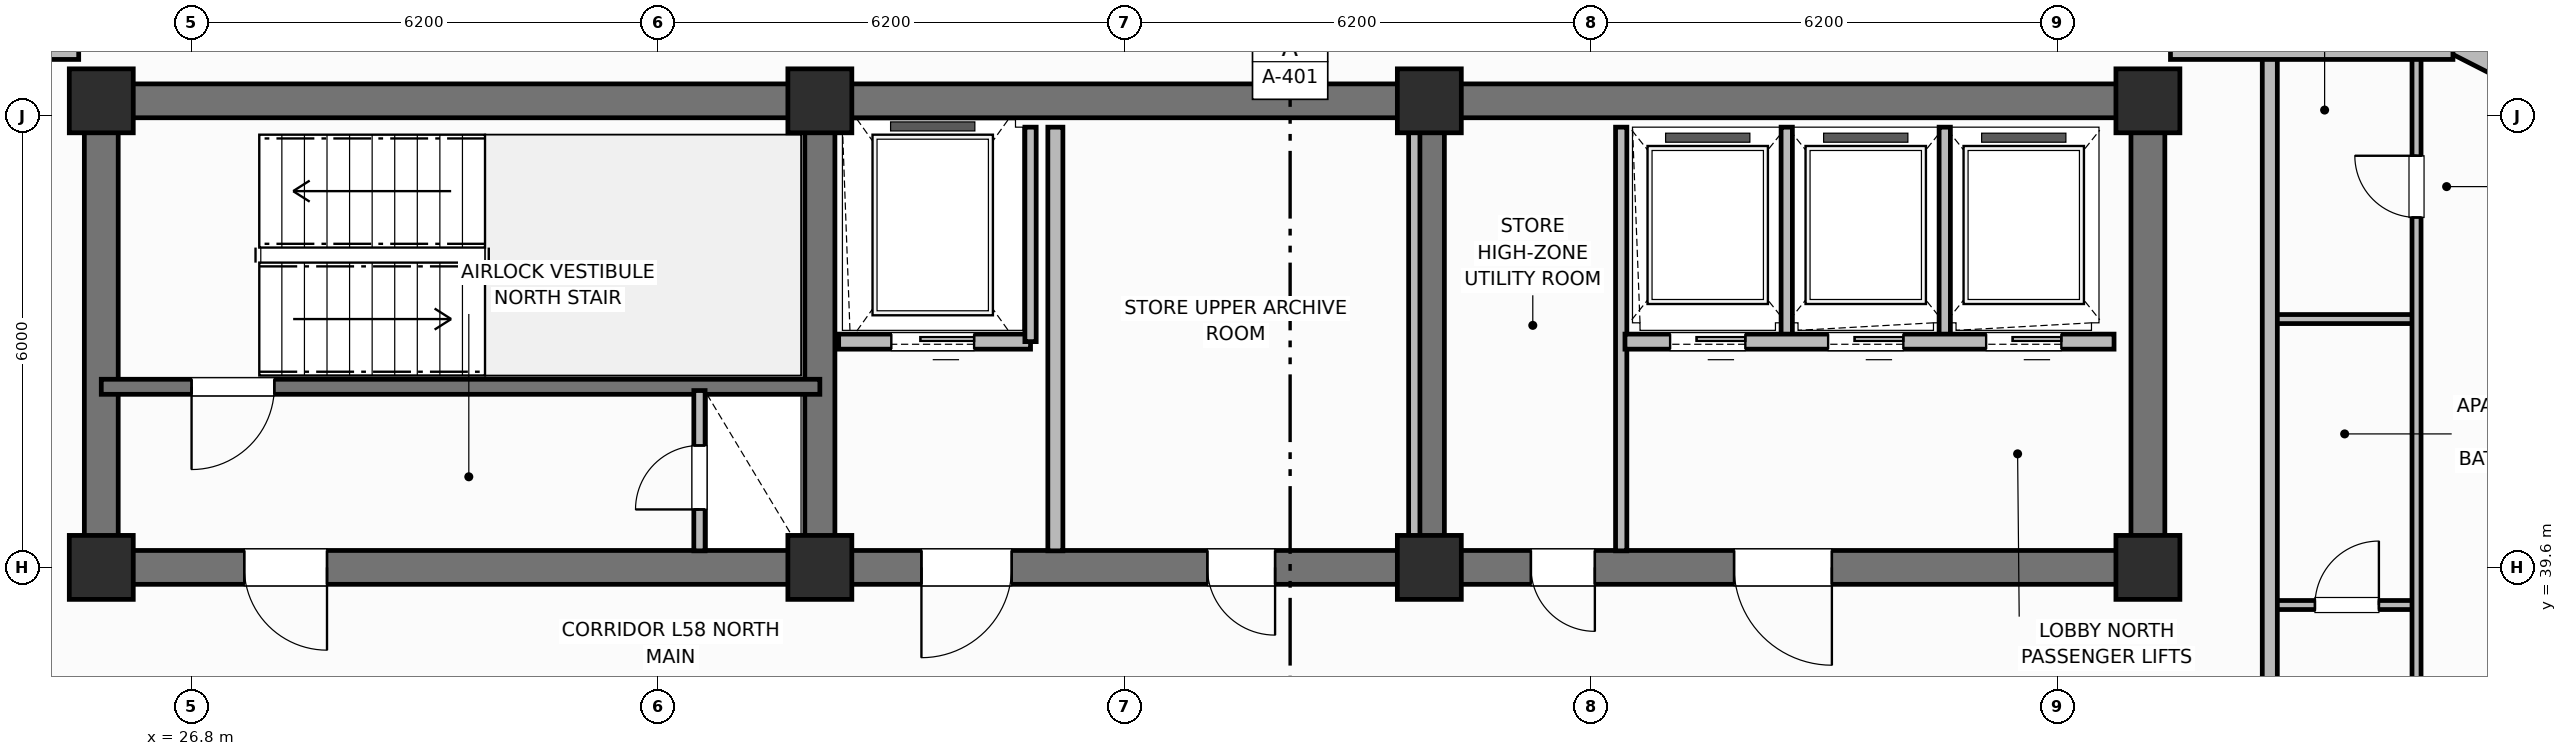
"""IFC4 building model, lengths in metres.
Left out: names, types, materials, properties, quantities, classifications, styles, units other than length and angle.
Written with IfcOpenShell. Run it as: python <this file> out.ifc"""

import sys

from ifc_helpers import new_model, si_unit, direction, frame, frame_2d, origin, origin_2d, place, context, subcontext, project, spatial, rectangle, extrude, element, fill, save


model = new_model("IFC4")
c1 = context("Model", 3, precision=1e-05, world=origin(), true_north=direction((0.0, 1.0)))
c2 = subcontext(c1, "Body", "Model", "MODEL_VIEW")
j1 = project(units=[si_unit("LENGTHUNIT", "METRE"), si_unit("PLANEANGLEUNIT", "RADIAN")], contexts=[c1])
p1 = place(None, origin())
s1 = spatial("IfcSite", under=j1, at=p1, CompositionType="ELEMENT")
p2 = place(p1, origin())
s2 = spatial("IfcBuilding", under=s1, at=p2, CompositionType="ELEMENT")
p3 = place(p2, frame((0.0, 0.0, 233.2)))
s3 = spatial("IfcBuildingStorey", under=s2, at=p3, CompositionType="ELEMENT", Elevation=233.2)
p4 = place(p3, frame((25.6, 45.8, 0.0), z_axis=(0.0, 0.0, 1.0), x_axis=(1.0, 0.0, 0.0)))
e1 = element("IfcWall", 1, at=p4, inside=s3, PredefinedType="SHEAR", context=c2, shape_type="SweptSolid", body=[
    extrude(rectangle(XDim=27.2, YDim=0.45, at=frame_2d((13.6, 0.0))), origin(), (0.0, 0.0, 1.0), 3.7),
])
for number, where, z_axis, x_axis in (
    (2, (25.6, 39.825, 0.0), (0.0, 0.0, 1.0), (0.0, 1.0, 0.0)),
    (3, (52.8, 39.825, 0.0), (0.0, 0.0, 1.0), (0.0, 1.0, 0.0)),
):
    element("IfcWall", number, at=place(p3, frame(where, z_axis=z_axis, x_axis=x_axis)), inside=s3, PredefinedType="SHEAR", context=c2, shape_type="SweptSolid", body=[
        extrude(rectangle(XDim=5.75, YDim=0.45, at=frame_2d((2.875, 0.0))), origin(), (0.0, 0.0, 1.0), 3.7),
    ])
p5 = place(p3, frame((52.8, 39.6, 0.0), z_axis=(0.0, 0.0, 1.0), x_axis=(-1.0, 0.0, 0.0)))
e4 = element("IfcWall", 4, at=p5, inside=s3, PredefinedType="SHEAR", context=c2, shape_type="SweptSolid", body=[
    extrude(rectangle(XDim=27.2, YDim=0.45, at=frame_2d((13.6, 0.0))), origin(), (0.0, 0.0, 1.0), 3.7),
])
p6 = place(p5, frame((24.2, 0.0, 0.0)))
e5 = element("IfcOpeningElement", 5, at=p6, cuts=e4, PredefinedType="OPENING", context=c2, shape_type="SweptSolid", body=[
    extrude(rectangle(XDim=1.1, YDim=2.15, at=frame_2d((0.55, 1.075))), frame((0.0, 0.235, 0.0), z_axis=(0.0, -1.0, 0.0), x_axis=(1.0, 0.0, 0.0)), (0.0, 0.0, 1.0), 0.47),
])
p7 = place(p5, frame((15.1, 0.0, 0.0)))
e6 = element("IfcOpeningElement", 6, at=p7, cuts=e4, PredefinedType="OPENING", context=c2, shape_type="SweptSolid", body=[
    extrude(rectangle(XDim=1.2, YDim=2.15, at=frame_2d((0.6, 1.075))), frame((0.0, 0.235, 0.0), z_axis=(0.0, -1.0, 0.0), x_axis=(1.0, 0.0, 0.0)), (0.0, 0.0, 1.0), 0.47),
])
p8 = place(p5, frame((11.6, 0.0, 0.0)))
e7 = element("IfcOpeningElement", 7, at=p8, cuts=e4, PredefinedType="OPENING", context=c2, shape_type="SweptSolid", body=[
    extrude(rectangle(XDim=0.9, YDim=2.1, at=frame_2d((0.45, 1.05))), frame((0.0, 0.235, 0.0), z_axis=(0.0, -1.0, 0.0), x_axis=(1.0, 0.0, 0.0)), (0.0, 0.0, 1.0), 0.47),
])
p9 = place(p5, frame((7.35, 0.0, 0.0)))
e8 = element("IfcOpeningElement", 8, at=p9, cuts=e4, PredefinedType="OPENING", context=c2, shape_type="SweptSolid", body=[
    extrude(rectangle(XDim=0.85, YDim=2.1, at=frame_2d((0.425, 1.05))), frame((0.0, 0.235, 0.0), z_axis=(0.0, -1.0, 0.0), x_axis=(1.0, 0.0, 0.0)), (0.0, 0.0, 1.0), 0.47),
])
p10 = place(p5, frame((4.2, 0.0, 0.0)))
e9 = element("IfcOpeningElement", 9, at=p10, cuts=e4, PredefinedType="OPENING", context=c2, shape_type="SweptSolid", body=[
    extrude(rectangle(XDim=1.3, YDim=2.2, at=frame_2d((0.65, 1.1))), frame((0.0, 0.235, 0.0), z_axis=(0.0, -1.0, 0.0), x_axis=(1.0, 0.0, 0.0)), (0.0, 0.0, 1.0), 0.47),
])
for number, where, z_axis, x_axis in (
    (10, (35.15, 39.825, 0.0), (0.0, 0.0, 1.0), (0.0, 1.0, 0.0)),
    (11, (43.25, 39.825, 0.0), (0.0, 0.0, 1.0), (0.0, 1.0, 0.0)),
):
    element("IfcWall", number, at=place(p3, frame(where, z_axis=z_axis, x_axis=x_axis)), inside=s3, PredefinedType="SHEAR", context=c2, shape_type="SweptSolid", body=[
        extrude(rectangle(XDim=5.75, YDim=0.4, at=frame_2d((2.875, 0.0))), origin(), (0.0, 0.0, 1.0), 3.7),
    ])
for number, where, z_axis, x_axis in (
    (12, (25.6, 39.6, 0.0), (0.0, 0.0, 1.0), (1.0, 0.0, 0.0)),
    (13, (25.6, 45.8, 0.0), (0.0, 0.0, 1.0), (1.0, 0.0, 0.0)),
    (14, (35.15, 39.6, 0.0), (0.0, 0.0, 1.0), (1.0, 0.0, 0.0)),
    (15, (35.15, 45.8, 0.0), (0.0, 0.0, 1.0), (1.0, 0.0, 0.0)),
    (16, (43.25, 39.6, 0.0), (0.0, 0.0, 1.0), (1.0, 0.0, 0.0)),
    (17, (43.25, 45.8, 0.0), (0.0, 0.0, 1.0), (1.0, 0.0, 0.0)),
    (18, (52.8, 39.6, 0.0), (0.0, 0.0, 1.0), (1.0, 0.0, 0.0)),
    (19, (52.8, 45.8, 0.0), (0.0, 0.0, 1.0), (1.0, 0.0, 0.0)),
):
    element("IfcColumn", number, at=place(p3, frame(where, z_axis=z_axis, x_axis=x_axis)), inside=s3, PredefinedType="COLUMN", context=c2, shape_type="SweptSolid", body=[
        extrude(rectangle(XDim=0.85, YDim=0.85, at=origin_2d()), origin(), (0.0, 0.0, 1.0), 3.7),
    ])
p11 = place(p3, frame((57.633, 46.188, 0.0), z_axis=(0.0, 0.0, 1.0), x_axis=(-0.891076589373, 0.453852962833, 0.0)))
e20 = element("IfcWall", 20, at=p11, inside=s3, PredefinedType="SOLIDWALL", context=c2, shape_type="SweptSolid", body=[
    extrude(rectangle(XDim=0.954, YDim=0.3, at=frame_2d((0.477, 0.0))), origin(), (0.0, 0.0, 1.0), 2.73),
])
p12 = place(p3, frame((35.15, 42.0, 0.0), z_axis=(0.0, 0.0, 1.0), x_axis=(-1.0, 0.0, 0.0)))
e21 = element("IfcWall", 21, at=p12, inside=s3, PredefinedType="SHEAR", context=c2, shape_type="SweptSolid", body=[
    extrude(rectangle(XDim=9.55, YDim=0.2, at=frame_2d((4.775, 0.0))), origin(), (0.0, 0.0, 1.0), 3.7),
])
p13 = place(p12, frame((7.25, 0.0, 0.0)))
e22 = element("IfcOpeningElement", 22, at=p13, cuts=e21, PredefinedType="OPENING", context=c2, shape_type="SweptSolid", body=[
    extrude(rectangle(XDim=1.1, YDim=2.15, at=frame_2d((0.55, 1.075))), frame((0.0, 0.11, 0.0), z_axis=(0.0, -1.0, 0.0), x_axis=(1.0, 0.0, 0.0)), (0.0, 0.0, 1.0), 0.22),
])
p14 = place(p3, frame((33.55, 39.82, 0.0), z_axis=(0.0, 0.0, 1.0), x_axis=(0.0, 1.0, 0.0)))
e23 = element("IfcWall", 23, at=p14, inside=s3, PredefinedType="PARTITIONING", context=c2, shape_type="SweptSolid", body=[
    extrude(rectangle(XDim=2.13, YDim=0.15, at=frame_2d((1.065, 0.0))), origin(), (0.0, 0.0, 1.0), 2.56),
])
p15 = place(p14, frame((0.55, 0.0, 0.0)))
e24 = element("IfcOpeningElement", 24, at=p15, cuts=e23, PredefinedType="OPENING", context=c2, shape_type="SweptSolid", body=[
    extrude(rectangle(XDim=0.85, YDim=2.05, at=frame_2d((0.425, 1.025))), frame((0.0, 0.085, 0.0), z_axis=(0.0, -1.0, 0.0), x_axis=(1.0, 0.0, 0.0)), (0.0, 0.0, 1.0), 0.17),
])
p16 = place(p3, frame((37.95, 42.6, 0.0), z_axis=(0.0, 0.0, 1.0), x_axis=(-1.0, 0.0, 0.0)))
e25 = element("IfcWall", 25, at=p16, inside=s3, PredefinedType="PARTITIONING", context=c2, shape_type="SweptSolid", body=[
    extrude(rectangle(XDim=2.55, YDim=0.2, at=frame_2d((1.275, 0.0))), origin(), (0.0, 0.0, 1.0), 2.33),
])
p17 = place(p16, frame((0.75, 0.0, 0.0)))
e26 = element("IfcOpeningElement", 26, at=p17, cuts=e25, PredefinedType="OPENING", context=c2, shape_type="SweptSolid", body=[
    extrude(rectangle(XDim=1.1, YDim=2.15, at=frame_2d((0.55, 1.075))), frame((0.0, 0.11, 0.0), z_axis=(0.0, -1.0, 0.0), x_axis=(1.0, 0.0, 0.0)), (0.0, 0.0, 1.0), 0.22),
])
p18 = place(p3, frame((37.95, 42.6, 0.0), z_axis=(0.0, 0.0, 1.0), x_axis=(0.0, 1.0, 0.0)))
e27 = element("IfcWall", 27, at=p18, inside=s3, PredefinedType="PARTITIONING", context=c2, shape_type="SweptSolid", body=[
    extrude(rectangle(XDim=2.85, YDim=0.15, at=frame_2d((1.425, 0.0))), origin(), (0.0, 0.0, 1.0), 2.56),
])
p19 = place(p3, frame((38.28, 39.82, 0.0), z_axis=(0.0, 0.0, 1.0), x_axis=(0.0, 1.0, 0.0)))
e28 = element("IfcWall", 28, at=p19, inside=s3, PredefinedType="PARTITIONING", context=c2, shape_type="SweptSolid", body=[
    extrude(rectangle(XDim=5.63, YDim=0.2, at=frame_2d((2.815, 0.0))), origin(), (0.0, 0.0, 1.0), 2.56),
])
for number, where, z_axis, x_axis in (
    (29, (43.05, 39.82, 0.0), (0.0, 0.0, 1.0), (0.0, 1.0, 0.0)),
    (30, (45.8, 39.82, 0.0), (0.0, 0.0, 1.0), (0.0, 1.0, 0.0)),
):
    element("IfcWall", number, at=place(p3, frame(where, z_axis=z_axis, x_axis=x_axis)), inside=s3, PredefinedType="PARTITIONING", context=c2, shape_type="SweptSolid", body=[
        extrude(rectangle(XDim=5.63, YDim=0.15, at=frame_2d((2.815, 0.0))), origin(), (0.0, 0.0, 1.0), 2.56),
    ])
for number, where, z_axis, x_axis in (
    (31, (48.0, 42.65, 0.0), (0.0, 0.0, 1.0), (0.0, 1.0, 0.0)),
    (32, (50.1, 42.65, 0.0), (0.0, 0.0, 1.0), (0.0, 1.0, 0.0)),
):
    element("IfcWall", number, at=place(p3, frame(where, z_axis=z_axis, x_axis=x_axis)), inside=s3, PredefinedType="PARTITIONING", context=c2, shape_type="SweptSolid", body=[
        extrude(rectangle(XDim=2.8, YDim=0.15, at=frame_2d((1.4, 0.0))), origin(), (0.0, 0.0, 1.0), 2.56),
    ])
p20 = place(p3, frame((52.35, 42.6, 0.0), z_axis=(0.0, 0.0, 1.0), x_axis=(-1.0, 0.0, 0.0)))
e33 = element("IfcWall", 33, at=p20, inside=s3, PredefinedType="PARTITIONING", context=c2, shape_type="SweptSolid", body=[
    extrude(rectangle(XDim=6.5, YDim=0.2, at=frame_2d((3.25, 0.0))), origin(), (0.0, 0.0, 1.0), 2.56),
])
p21 = place(p20, frame((4.9, 0.0, 0.0)))
e34 = element("IfcOpeningElement", 34, at=p21, cuts=e33, PredefinedType="OPENING", context=c2, shape_type="SweptSolid", body=[
    extrude(rectangle(XDim=1.0, YDim=2.15, at=frame_2d((0.5, 1.075))), frame((0.0, 0.11, 0.0), z_axis=(0.0, -1.0, 0.0), x_axis=(1.0, 0.0, 0.0)), (0.0, 0.0, 1.0), 0.22),
])
p22 = place(p20, frame((2.8, 0.0, 0.0)))
e35 = element("IfcOpeningElement", 35, at=p22, cuts=e33, PredefinedType="OPENING", context=c2, shape_type="SweptSolid", body=[
    extrude(rectangle(XDim=1.0, YDim=2.15, at=frame_2d((0.5, 1.075))), frame((0.0, 0.11, 0.0), z_axis=(0.0, -1.0, 0.0), x_axis=(1.0, 0.0, 0.0)), (0.0, 0.0, 1.0), 0.22),
])
p23 = place(p20, frame((0.7, 0.0, 0.0)))
e36 = element("IfcOpeningElement", 36, at=p23, cuts=e33, PredefinedType="OPENING", context=c2, shape_type="SweptSolid", body=[
    extrude(rectangle(XDim=1.0, YDim=2.15, at=frame_2d((0.5, 1.075))), frame((0.0, 0.11, 0.0), z_axis=(0.0, -1.0, 0.0), x_axis=(1.0, 0.0, 0.0)), (0.0, 0.0, 1.0), 0.22),
])
p24 = place(p3, frame((21.546, 46.45, 0.0), z_axis=(0.0, 0.0, 1.0), x_axis=(1.0, 0.0, 0.0)))
e37 = element("IfcWall", 37, at=p24, inside=s3, PredefinedType="PARTITIONING", context=c2, shape_type="SweptSolid", body=[
    extrude(rectangle(XDim=3.754, YDim=0.2, at=frame_2d((1.877, 0.0))), origin(), (0.0, 0.0, 1.0), 2.56),
])
p25 = place(p3, frame((54.42, 39.1, 0.0), z_axis=(0.0, 0.0, 1.0), x_axis=(1.0, 0.0, 0.0)))
e38 = element("IfcWall", 38, at=p25, inside=s3, PredefinedType="PARTITIONING", context=c2, shape_type="SweptSolid", body=[
    extrude(rectangle(XDim=1.95, YDim=0.12, at=frame_2d((0.975, 0.0))), origin(), (0.0, 0.0, 1.0), 2.56),
])
p26 = place(p25, frame((0.6, 0.0, 0.0)))
e39 = element("IfcOpeningElement", 39, at=p26, cuts=e38, PredefinedType="OPENING", context=c2, shape_type="SweptSolid", body=[
    extrude(rectangle(XDim=0.85, YDim=2.1, at=frame_2d((0.425, 1.05))), frame((0.0, 0.07, 0.0), z_axis=(0.0, -1.0, 0.0), x_axis=(1.0, 0.0, 0.0)), (0.0, 0.0, 1.0), 0.14),
])
p27 = place(p3, frame((54.42, 42.9, 0.0), z_axis=(0.0, 0.0, 1.0), x_axis=(1.0, 0.0, 0.0)))
e40 = element("IfcWall", 40, at=p27, inside=s3, PredefinedType="PARTITIONING", context=c2, shape_type="SweptSolid", body=[
    extrude(rectangle(XDim=1.95, YDim=0.12, at=frame_2d((0.975, 0.0))), origin(), (0.0, 0.0, 1.0), 2.56),
])
p28 = place(p3, frame((56.37, 33.74, 0.0), z_axis=(0.0, 0.0, 1.0), x_axis=(0.0, 1.0, 0.0)))
e41 = element("IfcWall", 41, at=p28, inside=s3, PredefinedType="PARTITIONING", context=c2, shape_type="SweptSolid", body=[
    extrude(rectangle(XDim=12.67, YDim=0.12, at=frame_2d((6.335, 0.0))), origin(), (0.0, 0.0, 1.0), 2.56),
])
p29 = place(p28, frame((0.61, 0.0, 0.0)))
e42 = element("IfcOpeningElement", 42, at=p29, cuts=e41, PredefinedType="OPENING", context=c2, shape_type="SweptSolid", body=[
    extrude(rectangle(XDim=0.9, YDim=2.1, at=frame_2d((0.45, 1.05))), frame((0.0, 0.07, 0.0), z_axis=(0.0, -1.0, 0.0), x_axis=(1.0, 0.0, 0.0)), (0.0, 0.0, 1.0), 0.14),
])
p30 = place(p28, frame((10.51, 0.0, 0.0)))
e43 = element("IfcOpeningElement", 43, at=p30, cuts=e41, PredefinedType="OPENING", context=c2, shape_type="SweptSolid", body=[
    extrude(rectangle(XDim=0.82, YDim=2.08, at=frame_2d((0.41, 1.04))), frame((0.0, 0.07, 0.0), z_axis=(0.0, -1.0, 0.0), x_axis=(1.0, 0.0, 0.0)), (0.0, 0.0, 1.0), 0.14),
])
p31 = place(p3, frame((54.42, 9.95, 0.0), z_axis=(0.0, 0.0, 1.0), x_axis=(0.0, 1.0, 0.0)))
e44 = element("IfcWall", 44, at=p31, inside=s3, PredefinedType="PARTITIONING", context=c2, shape_type="SweptSolid", body=[
    extrude(rectangle(XDim=36.5, YDim=0.2, at=frame_2d((18.25, 0.0))), origin(), (0.0, 0.0, 1.0), 2.56),
])
p32 = place(p31, frame((3.25, 0.0, 0.0)))
e45 = element("IfcOpeningElement", 45, at=p32, cuts=e44, PredefinedType="OPENING", context=c2, shape_type="SweptSolid", body=[
    extrude(rectangle(XDim=1.0, YDim=2.15, at=frame_2d((0.5, 1.075))), frame((0.0, 0.11, 0.0), z_axis=(0.0, -1.0, 0.0), x_axis=(1.0, 0.0, 0.0)), (0.0, 0.0, 1.0), 0.22),
])
p33 = place(p31, frame((12.96, 0.0, 0.0)))
e46 = element("IfcOpeningElement", 46, at=p33, cuts=e44, PredefinedType="OPENING", context=c2, shape_type="SweptSolid", body=[
    extrude(rectangle(XDim=1.0, YDim=2.15, at=frame_2d((0.5, 1.075))), frame((0.0, 0.11, 0.0), z_axis=(0.0, -1.0, 0.0), x_axis=(1.0, 0.0, 0.0)), (0.0, 0.0, 1.0), 0.22),
])
p34 = place(p31, frame((24.3, 0.0, 0.0)))
e47 = element("IfcOpeningElement", 47, at=p34, cuts=e44, PredefinedType="OPENING", context=c2, shape_type="SweptSolid", body=[
    extrude(rectangle(XDim=1.0, YDim=2.15, at=frame_2d((0.5, 1.075))), frame((0.0, 0.11, 0.0), z_axis=(0.0, -1.0, 0.0), x_axis=(1.0, 0.0, 0.0)), (0.0, 0.0, 1.0), 0.22),
])
p35 = place(p3, frame((53.1, 46.45, 0.0), z_axis=(0.0, 0.0, 1.0), x_axis=(1.0, 0.0, 0.0)))
e48 = element("IfcWall", 48, at=p35, inside=s3, PredefinedType="PARTITIONING", context=c2, shape_type="SweptSolid", body=[
    extrude(rectangle(XDim=3.754, YDim=0.2, at=frame_2d((1.877, 0.0))), origin(), (0.0, 0.0, 1.0), 2.56),
])
p36 = place(p13, origin())
e49 = element("IfcDoor", 49, at=p36, inside=s3, OperationType="SINGLE_SWING_RIGHT", PredefinedType="DOOR", context=c2, shape_type="SweptSolid", body=[
    extrude(rectangle(XDim=1.1, YDim=2.15, at=frame_2d((0.55, 1.075))), frame((0.0, 0.025, 0.0), z_axis=(0.0, -1.0, 0.0), x_axis=(1.0, 0.0, 0.0)), (0.0, 0.0, 1.0), 0.05),
])
fill(e22, e49)
p37 = place(p15, origin())
e50 = element("IfcDoor", 50, at=p37, inside=s3, OperationType="SINGLE_SWING_LEFT", PredefinedType="TRAPDOOR", context=c2, shape_type="SweptSolid", body=[
    extrude(rectangle(XDim=0.85, YDim=2.05, at=frame_2d((0.425, 1.025))), frame((0.0, 0.025, 0.0), z_axis=(0.0, -1.0, 0.0), x_axis=(1.0, 0.0, 0.0)), (0.0, 0.0, 1.0), 0.05),
])
fill(e24, e50)
p38 = place(p17, origin())
e51 = element("IfcDoor", 51, at=p38, inside=s3, OperationType="SLIDING_TO_LEFT", PredefinedType="DOOR", context=c2, shape_type="SweptSolid", body=[
    extrude(rectangle(XDim=1.1, YDim=2.15, at=frame_2d((0.55, 1.075))), frame((0.0, 0.025, 0.0), z_axis=(0.0, -1.0, 0.0), x_axis=(1.0, 0.0, 0.0)), (0.0, 0.0, 1.0), 0.05),
])
fill(e26, e51)
p39 = place(p21, origin())
e52 = element("IfcDoor", 52, at=p39, inside=s3, OperationType="SLIDING_TO_LEFT", PredefinedType="DOOR", context=c2, shape_type="SweptSolid", body=[
    extrude(rectangle(XDim=1.0, YDim=2.15, at=frame_2d((0.5, 1.075))), frame((0.0, 0.025, 0.0), z_axis=(0.0, -1.0, 0.0), x_axis=(1.0, 0.0, 0.0)), (0.0, 0.0, 1.0), 0.05),
])
fill(e34, e52)
p40 = place(p22, origin())
e53 = element("IfcDoor", 53, at=p40, inside=s3, OperationType="SLIDING_TO_LEFT", PredefinedType="DOOR", context=c2, shape_type="SweptSolid", body=[
    extrude(rectangle(XDim=1.0, YDim=2.15, at=frame_2d((0.5, 1.075))), frame((0.0, 0.025, 0.0), z_axis=(0.0, -1.0, 0.0), x_axis=(1.0, 0.0, 0.0)), (0.0, 0.0, 1.0), 0.05),
])
fill(e35, e53)
p41 = place(p23, origin())
e54 = element("IfcDoor", 54, at=p41, inside=s3, OperationType="SLIDING_TO_LEFT", PredefinedType="DOOR", context=c2, shape_type="SweptSolid", body=[
    extrude(rectangle(XDim=1.0, YDim=2.15, at=frame_2d((0.5, 1.075))), frame((0.0, 0.025, 0.0), z_axis=(0.0, -1.0, 0.0), x_axis=(1.0, 0.0, 0.0)), (0.0, 0.0, 1.0), 0.05),
])
fill(e36, e54)
p42 = place(p26, origin())
e55 = element("IfcDoor", 55, at=p42, inside=s3, OperationType="SINGLE_SWING_RIGHT", PredefinedType="DOOR", context=c2, shape_type="SweptSolid", body=[
    extrude(rectangle(XDim=0.85, YDim=2.1, at=frame_2d((0.425, 1.05))), frame((0.0, 0.025, 0.0), z_axis=(0.0, -1.0, 0.0), x_axis=(1.0, 0.0, 0.0)), (0.0, 0.0, 1.0), 0.05),
])
fill(e39, e55)
p43 = place(p30, origin())
e56 = element("IfcDoor", 56, at=p43, inside=s3, OperationType="SINGLE_SWING_RIGHT", PredefinedType="DOOR", context=c2, shape_type="SweptSolid", body=[
    extrude(rectangle(XDim=0.82, YDim=2.08, at=frame_2d((0.41, 1.04))), frame((0.0, 0.025, 0.0), z_axis=(0.0, -1.0, 0.0), x_axis=(1.0, 0.0, 0.0)), (0.0, 0.0, 1.0), 0.05),
])
fill(e43, e56)
p44 = place(p6, origin())
e57 = element("IfcDoor", 57, at=p44, inside=s3, OperationType="SINGLE_SWING_LEFT", PredefinedType="DOOR", context=c2, shape_type="SweptSolid", body=[
    extrude(rectangle(XDim=1.1, YDim=2.15, at=frame_2d((0.55, 1.075))), frame((0.0, 0.025, 0.0), z_axis=(0.0, -1.0, 0.0), x_axis=(1.0, 0.0, 0.0)), (0.0, 0.0, 1.0), 0.05),
])
fill(e5, e57)
p45 = place(p7, origin())
e58 = element("IfcDoor", 58, at=p45, inside=s3, OperationType="SINGLE_SWING_RIGHT", PredefinedType="DOOR", context=c2, shape_type="SweptSolid", body=[
    extrude(rectangle(XDim=1.2, YDim=2.15, at=frame_2d((0.6, 1.075))), frame((0.0, 0.025, 0.0), z_axis=(0.0, -1.0, 0.0), x_axis=(1.0, 0.0, 0.0)), (0.0, 0.0, 1.0), 0.05),
])
fill(e6, e58)
p46 = place(p8, origin())
e59 = element("IfcDoor", 59, at=p46, inside=s3, OperationType="SINGLE_SWING_LEFT", PredefinedType="DOOR", context=c2, shape_type="SweptSolid", body=[
    extrude(rectangle(XDim=0.9, YDim=2.1, at=frame_2d((0.45, 1.05))), frame((0.0, 0.025, 0.0), z_axis=(0.0, -1.0, 0.0), x_axis=(1.0, 0.0, 0.0)), (0.0, 0.0, 1.0), 0.05),
])
fill(e7, e59)
p47 = place(p9, origin())
e60 = element("IfcDoor", 60, at=p47, inside=s3, OperationType="SINGLE_SWING_LEFT", PredefinedType="DOOR", context=c2, shape_type="SweptSolid", body=[
    extrude(rectangle(XDim=0.85, YDim=2.1, at=frame_2d((0.425, 1.05))), frame((0.0, 0.025, 0.0), z_axis=(0.0, -1.0, 0.0), x_axis=(1.0, 0.0, 0.0)), (0.0, 0.0, 1.0), 0.05),
])
fill(e8, e60)
p48 = place(p10, origin())
e61 = element("IfcDoor", 61, at=p48, inside=s3, OperationType="SINGLE_SWING_LEFT", PredefinedType="DOOR", context=c2, shape_type="SweptSolid", body=[
    extrude(rectangle(XDim=1.3, YDim=2.2, at=frame_2d((0.65, 1.1))), frame((0.0, 0.025, 0.0), z_axis=(0.0, -1.0, 0.0), x_axis=(1.0, 0.0, 0.0)), (0.0, 0.0, 1.0), 0.05),
])
fill(e9, e61)
save(model, sys.argv[1])
